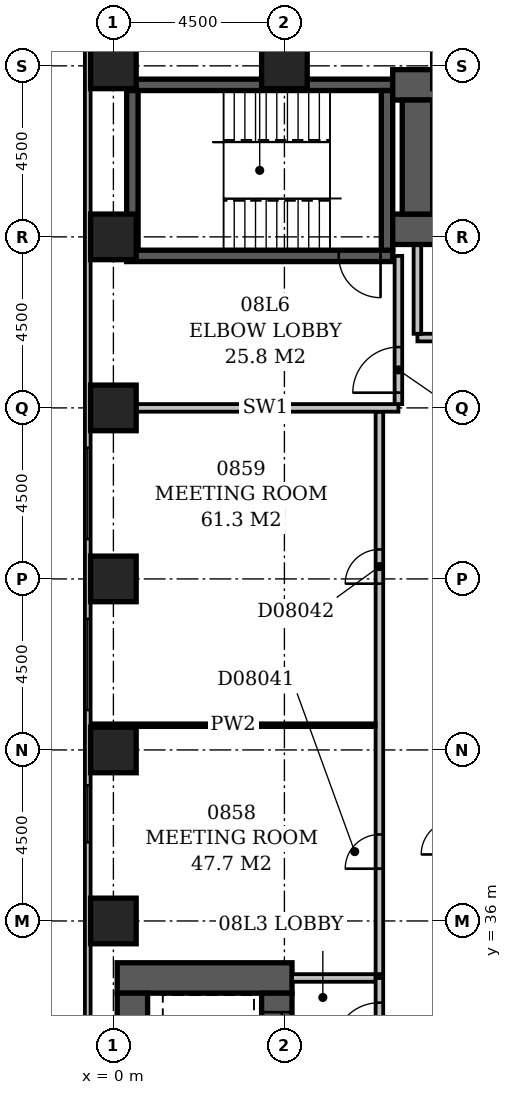
"""IFC4 building model, lengths in metres.
Left out: names, types, materials, properties, quantities, classifications, styles, units other than length and angle.
Written with IfcOpenShell. Run it as: python <this file> out.ifc"""

import sys

from ifc_helpers import new_model, si_unit, direction, frame, frame_2d, origin, origin_2d, place, context, subcontext, project, spatial, rectangle, extrude, element, fill, save


model = new_model("IFC4")
c1 = context("Model", 3, precision=1e-05, world=origin(), true_north=direction((0.0, 1.0)))
c2 = subcontext(c1, "Body", "Model", "MODEL_VIEW")
j1 = project(units=[si_unit("LENGTHUNIT", "METRE"), si_unit("PLANEANGLEUNIT", "RADIAN")], contexts=[c1])
p1 = place(None, origin())
s1 = spatial("IfcSite", under=j1, at=p1, CompositionType="ELEMENT")
p2 = place(p1, origin())
s2 = spatial("IfcBuilding", under=s1, at=p2, CompositionType="ELEMENT")
p3 = place(p2, frame((0.0, 0.0, 39.8)))
s3 = spatial("IfcBuildingStorey", under=s2, at=p3, CompositionType="ELEMENT", Elevation=39.8)
p4 = place(p3, frame((0.1, 34.5, -0.3), z_axis=(0.0, 0.0, 1.0), x_axis=(1.0, 0.0, 0.0)))
e1 = element("IfcWall", 1, at=p4, inside=s3, PredefinedType="SHEAR", context=c2, shape_type="SweptSolid", body=[
    extrude(rectangle(XDim=4.6, YDim=0.8, at=frame_2d((2.3, 0.0))), origin(), (0.0, 0.0, 1.0), 3.6),
])
p5 = place(p3, frame((0.35, 53.5, -0.3), z_axis=(0.0, 0.0, 1.0), x_axis=(1.0, 0.0, 0.0)))
e2 = element("IfcWall", 2, at=p5, inside=s3, PredefinedType="SHEAR", context=c2, shape_type="SweptSolid", body=[
    extrude(rectangle(XDim=7.0, YDim=0.3, at=frame_2d((3.5, 0.0))), origin(), (0.0, 0.0, 1.0), 3.6),
])
p6 = place(p5, frame((5.58, 0.0, 0.3)))
e3 = element("IfcOpeningElement", 3, at=p6, cuts=e2, PredefinedType="OPENING", context=c2, shape_type="SweptSolid", body=[
    extrude(rectangle(XDim=1.1, YDim=2.1, at=frame_2d((0.55, 1.05))), frame((0.0, 0.162, 0.0), z_axis=(0.0, -1.0, 0.0), x_axis=(1.0, 0.0, 0.0)), (0.0, 0.0, 1.0), 0.324),
])
p7 = place(p3, frame((0.35, 58.0, -0.3), z_axis=(0.0, 0.0, 1.0), x_axis=(1.0, 0.0, 0.0)))
e4 = element("IfcWall", 4, at=p7, inside=s3, PredefinedType="SHEAR", context=c2, shape_type="SweptSolid", body=[
    extrude(rectangle(XDim=7.0, YDim=0.3, at=frame_2d((3.5, 0.0))), origin(), (0.0, 0.0, 1.0), 3.6),
])
p8 = place(p3, frame((0.5, 27.15, -0.3), z_axis=(0.0, 0.0, 1.0), x_axis=(0.0, 1.0, 0.0)))
e5 = element("IfcWall", 5, at=p8, inside=s3, PredefinedType="SHEAR", context=c2, shape_type="SweptSolid", body=[
    extrude(rectangle(XDim=6.95, YDim=0.8, at=frame_2d((3.475, 0.0))), origin(), (0.0, 0.0, 1.0), 3.6),
])
p9 = place(p3, frame((0.5, 53.65, -0.3), z_axis=(0.0, 0.0, 1.0), x_axis=(0.0, 1.0, 0.0)))
e6 = element("IfcWall", 6, at=p9, inside=s3, PredefinedType="SHEAR", context=c2, shape_type="SweptSolid", body=[
    extrude(rectangle(XDim=4.2, YDim=0.3, at=frame_2d((2.1, 0.0))), origin(), (0.0, 0.0, 1.0), 3.6),
])
p10 = place(p3, frame((4.3, 27.15, -0.3), z_axis=(0.0, 0.0, 1.0), x_axis=(0.0, 1.0, 0.0)))
e7 = element("IfcWall", 7, at=p10, inside=s3, PredefinedType="SHEAR", context=c2, shape_type="SweptSolid", body=[
    extrude(rectangle(XDim=6.95, YDim=0.8, at=frame_2d((3.475, 0.0))), origin(), (0.0, 0.0, 1.0), 3.6),
])
p11 = place(p10, frame((3.05, 0.0, 0.3)))
e8 = element("IfcOpeningElement", 8, at=p11, cuts=e7, PredefinedType="OPENING", context=c2, shape_type="SweptSolid", body=[
    extrude(rectangle(XDim=1.1, YDim=2.1, at=frame_2d((0.55, 1.05))), frame((0.0, 0.412, 0.0), z_axis=(0.0, -1.0, 0.0), x_axis=(1.0, 0.0, 0.0)), (0.0, 0.0, 1.0), 0.824),
])
p12 = place(p10, frame((0.55, 0.0, 0.3)))
e9 = element("IfcOpeningElement", 9, at=p12, cuts=e7, PredefinedType="OPENING", context=c2, shape_type="SweptSolid", body=[
    extrude(rectangle(XDim=1.1, YDim=2.1, at=frame_2d((0.55, 1.05))), frame((0.0, 0.412, 0.0), z_axis=(0.0, -1.0, 0.0), x_axis=(1.0, 0.0, 0.0)), (0.0, 0.0, 1.0), 0.824),
])
p13 = place(p10, frame((5.35, 0.0, 0.3)))
e10 = element("IfcOpeningElement", 10, at=p13, cuts=e7, PredefinedType="OPENING", context=c2, shape_type="SweptSolid", body=[
    extrude(rectangle(XDim=1.1, YDim=2.1, at=frame_2d((0.55, 1.05))), frame((0.0, 0.412, 0.0), z_axis=(0.0, -1.0, 0.0), x_axis=(1.0, 0.0, 0.0)), (0.0, 0.0, 1.0), 0.824),
])
p14 = place(p3, frame((7.2, 53.65, -0.3), z_axis=(0.0, 0.0, 1.0), x_axis=(0.0, 1.0, 0.0)))
e11 = element("IfcWall", 11, at=p14, inside=s3, PredefinedType="SHEAR", context=c2, shape_type="SweptSolid", body=[
    extrude(rectangle(XDim=4.2, YDim=0.3, at=frame_2d((2.1, 0.0))), origin(), (0.0, 0.0, 1.0), 3.6),
])
p15 = place(p3, frame((7.35, 54.2, -0.3), z_axis=(0.0, 0.0, 1.0), x_axis=(1.0, 0.0, 0.0)))
e12 = element("IfcWall", 12, at=p15, inside=s3, PredefinedType="SHEAR", context=c2, shape_type="SweptSolid", body=[
    extrude(rectangle(XDim=16.45, YDim=0.8, at=frame_2d((8.225, 0.0))), origin(), (0.0, 0.0, 1.0), 3.6),
])
p16 = place(p15, frame((1.35, 0.0, 0.3)))
e13 = element("IfcOpeningElement", 13, at=p16, cuts=e12, PredefinedType="OPENING", context=c2, shape_type="SweptSolid", body=[
    extrude(rectangle(XDim=1.1, YDim=2.1, at=frame_2d((0.55, 1.05))), frame((0.0, 0.412, 0.0), z_axis=(0.0, -1.0, 0.0), x_axis=(1.0, 0.0, 0.0)), (0.0, 0.0, 1.0), 0.824),
])
p17 = place(p15, frame((3.85, 0.0, 0.3)))
e14 = element("IfcOpeningElement", 14, at=p17, cuts=e12, PredefinedType="OPENING", context=c2, shape_type="SweptSolid", body=[
    extrude(rectangle(XDim=1.1, YDim=2.1, at=frame_2d((0.55, 1.05))), frame((0.0, 0.412, 0.0), z_axis=(0.0, -1.0, 0.0), x_axis=(1.0, 0.0, 0.0)), (0.0, 0.0, 1.0), 0.824),
])
p18 = place(p15, frame((6.35, 0.0, 0.3)))
e15 = element("IfcOpeningElement", 15, at=p18, cuts=e12, PredefinedType="OPENING", context=c2, shape_type="SweptSolid", body=[
    extrude(rectangle(XDim=1.1, YDim=2.1, at=frame_2d((0.55, 1.05))), frame((0.0, 0.412, 0.0), z_axis=(0.0, -1.0, 0.0), x_axis=(1.0, 0.0, 0.0)), (0.0, 0.0, 1.0), 0.824),
])
p19 = place(p15, frame((8.85, 0.0, 0.3)))
e16 = element("IfcOpeningElement", 16, at=p19, cuts=e12, PredefinedType="OPENING", context=c2, shape_type="SweptSolid", body=[
    extrude(rectangle(XDim=1.1, YDim=2.1, at=frame_2d((0.55, 1.05))), frame((0.0, 0.412, 0.0), z_axis=(0.0, -1.0, 0.0), x_axis=(1.0, 0.0, 0.0)), (0.0, 0.0, 1.0), 0.824),
])
p20 = place(p15, frame((11.35, 0.0, 0.3)))
e17 = element("IfcOpeningElement", 17, at=p20, cuts=e12, PredefinedType="OPENING", context=c2, shape_type="SweptSolid", body=[
    extrude(rectangle(XDim=1.1, YDim=2.1, at=frame_2d((0.55, 1.05))), frame((0.0, 0.412, 0.0), z_axis=(0.0, -1.0, 0.0), x_axis=(1.0, 0.0, 0.0)), (0.0, 0.0, 1.0), 0.824),
])
p21 = place(p15, frame((13.85, 0.0, 0.3)))
e18 = element("IfcOpeningElement", 18, at=p21, cuts=e12, PredefinedType="OPENING", context=c2, shape_type="SweptSolid", body=[
    extrude(rectangle(XDim=1.1, YDim=2.1, at=frame_2d((0.55, 1.05))), frame((0.0, 0.412, 0.0), z_axis=(0.0, -1.0, 0.0), x_axis=(1.0, 0.0, 0.0)), (0.0, 0.0, 1.0), 0.824),
])
p22 = place(p3, frame((7.35, 58.0, -0.3), z_axis=(0.0, 0.0, 1.0), x_axis=(1.0, 0.0, 0.0)))
e19 = element("IfcWall", 19, at=p22, inside=s3, PredefinedType="SHEAR", context=c2, shape_type="SweptSolid", body=[
    extrude(rectangle(XDim=16.45, YDim=0.8, at=frame_2d((8.225, 0.0))), origin(), (0.0, 0.0, 1.0), 3.6),
])
p23 = place(p3, frame((8.0, 54.6, -0.3), z_axis=(0.0, 0.0, 1.0), x_axis=(0.0, 1.0, 0.0)))
e20 = element("IfcWall", 20, at=p23, inside=s3, PredefinedType="SHEAR", context=c2, shape_type="SweptSolid", body=[
    extrude(rectangle(XDim=3.0, YDim=0.8, at=frame_2d((1.5, 0.0))), origin(), (0.0, 0.0, 1.0), 3.6),
])
for number, where, z_axis, x_axis in (
    (21, (0.0, 36.0, -0.3), (0.0, 0.0, 1.0), (1.0, 0.0, 0.0)),
    (22, (0.0, 40.5, -0.3), (0.0, 0.0, 1.0), (1.0, 0.0, 0.0)),
    (23, (0.0, 45.0, -0.3), (0.0, 0.0, 1.0), (1.0, 0.0, 0.0)),
    (24, (0.0, 49.5, -0.3), (0.0, 0.0, 1.0), (1.0, 0.0, 0.0)),
    (25, (0.0, 54.0, -0.3), (0.0, 0.0, 1.0), (1.0, 0.0, 0.0)),
    (26, (0.0, 58.5, -0.3), (0.0, 0.0, 1.0), (1.0, 0.0, 0.0)),
    (27, (4.5, 58.5, -0.3), (0.0, 0.0, 1.0), (1.0, 0.0, 0.0)),
):
    element("IfcColumn", number, at=place(p3, frame(where, z_axis=z_axis, x_axis=x_axis)), inside=s3, PredefinedType="COLUMN", context=c2, shape_type="SweptSolid", body=[
        extrude(rectangle(XDim=1.2, YDim=1.2, at=origin_2d()), origin(), (0.0, 0.0, 1.0), 3.6),
    ])
p24 = place(p3, frame((-0.675, 59.1, 0.0), z_axis=(0.0, 0.0, 1.0), x_axis=(0.0, -1.0, 0.0)))
e28 = element("IfcWall", 28, at=p24, inside=s3, PredefinedType="STANDARD", context=c2, shape_type="SweptSolid", body=[
    extrude(rectangle(XDim=55.35, YDim=0.15, at=frame_2d((27.675, 0.0))), origin(), (0.0, 0.0, 1.0), 2.7),
])
p25 = place(p24, frame((10.65, 0.0, 0.6)))
e29 = element("IfcOpeningElement", 29, at=p25, cuts=e28, PredefinedType="OPENING", context=c2, shape_type="SweptSolid", body=[
    extrude(rectangle(XDim=2.4, YDim=1.8, at=frame_2d((1.2, 0.9))), frame((0.0, 0.087, 0.0), z_axis=(0.0, -1.0, 0.0), x_axis=(1.0, 0.0, 0.0)), (0.0, 0.0, 1.0), 0.174),
])
p26 = place(p24, frame((15.15, 0.0, 0.6)))
e30 = element("IfcOpeningElement", 30, at=p26, cuts=e28, PredefinedType="OPENING", context=c2, shape_type="SweptSolid", body=[
    extrude(rectangle(XDim=2.4, YDim=1.8, at=frame_2d((1.2, 0.9))), frame((0.0, 0.087, 0.0), z_axis=(0.0, -1.0, 0.0), x_axis=(1.0, 0.0, 0.0)), (0.0, 0.0, 1.0), 0.174),
])
p27 = place(p24, frame((19.53, 0.0, 0.6)))
e31 = element("IfcOpeningElement", 31, at=p27, cuts=e28, PredefinedType="OPENING", context=c2, shape_type="SweptSolid", body=[
    extrude(rectangle(XDim=1.5, YDim=1.8, at=frame_2d((0.75, 0.9))), frame((0.0, 0.087, 0.0), z_axis=(0.0, -1.0, 0.0), x_axis=(1.0, 0.0, 0.0)), (0.0, 0.0, 1.0), 0.174),
])
p28 = place(p3, frame((8.0, 51.35, 0.0), z_axis=(0.0, 0.0, 1.0), x_axis=(1.0, 0.0, 0.0)))
e32 = element("IfcWall", 32, at=p28, inside=s3, PredefinedType="PARTITIONING", context=c2, shape_type="SweptSolid", body=[
    extrude(rectangle(XDim=15.0, YDim=0.2, at=frame_2d((7.5, 0.0))), origin(), (0.0, 0.0, 1.0), 3.3),
])
p29 = place(p28, frame((3.4, 0.0, 0.0)))
e33 = element("IfcOpeningElement", 33, at=p29, cuts=e32, PredefinedType="OPENING", context=c2, shape_type="SweptSolid", body=[
    extrude(rectangle(XDim=1.2, YDim=2.1, at=frame_2d((0.6, 1.05))), frame((0.0, 0.112, 0.0), z_axis=(0.0, -1.0, 0.0), x_axis=(1.0, 0.0, 0.0)), (0.0, 0.0, 1.0), 0.224),
])
p30 = place(p28, frame((9.4, 0.0, 0.0)))
e34 = element("IfcOpeningElement", 34, at=p30, cuts=e32, PredefinedType="OPENING", context=c2, shape_type="SweptSolid", body=[
    extrude(rectangle(XDim=1.2, YDim=2.1, at=frame_2d((0.6, 1.05))), frame((0.0, 0.112, 0.0), z_axis=(0.0, -1.0, 0.0), x_axis=(1.0, 0.0, 0.0)), (0.0, 0.0, 1.0), 0.224),
])
p31 = place(p3, frame((8.0, 51.45, 0.0), z_axis=(0.0, 0.0, 1.0), x_axis=(0.0, 1.0, 0.0)))
e35 = element("IfcWall", 35, at=p31, inside=s3, PredefinedType="PARTITIONING", context=c2, shape_type="SweptSolid", body=[
    extrude(rectangle(XDim=2.33, YDim=0.2, at=frame_2d((1.165, 0.0))), origin(), (0.0, 0.0, 1.0), 3.3),
])
p32 = place(p3, frame((7.0, 32.1, 0.0), z_axis=(0.0, 0.0, 1.0), x_axis=(0.0, 1.0, 0.0)))
e36 = element("IfcWall", 36, at=p32, inside=s3, PredefinedType="PARTITIONING", context=c2, shape_type="SweptSolid", body=[
    extrude(rectangle(XDim=2.4, YDim=0.2, at=frame_2d((1.2, 0.0))), origin(), (0.0, 0.0, 1.0), 3.3),
])
p33 = place(p32, frame((0.55, 0.0, 0.0)))
e37 = element("IfcOpeningElement", 37, at=p33, cuts=e36, PredefinedType="OPENING", context=c2, shape_type="SweptSolid", body=[
    extrude(rectangle(XDim=1.2, YDim=2.1, at=frame_2d((0.6, 1.05))), frame((0.0, 0.112, 0.0), z_axis=(0.0, -1.0, 0.0), x_axis=(1.0, 0.0, 0.0)), (0.0, 0.0, 1.0), 0.224),
])
p34 = place(p3, frame((4.7, 34.5, 0.0), z_axis=(0.0, 0.0, 1.0), x_axis=(1.0, 0.0, 0.0)))
e38 = element("IfcWall", 38, at=p34, inside=s3, PredefinedType="PARTITIONING", context=c2, shape_type="SweptSolid", body=[
    extrude(rectangle(XDim=2.2, YDim=0.2, at=frame_2d((1.1, 0.0))), origin(), (0.0, 0.0, 1.0), 3.3),
])
p35 = place(p3, frame((0.5, 49.5, 0.0), z_axis=(0.0, 0.0, 1.0), x_axis=(1.0, 0.0, 0.0)))
e39 = element("IfcWall", 39, at=p35, inside=s3, PredefinedType="PARTITIONING", context=c2, shape_type="SweptSolid", body=[
    extrude(rectangle(XDim=7.0, YDim=0.2, at=frame_2d((3.5, 0.0))), origin(), (0.0, 0.0, 1.0), 3.3),
])
p36 = place(p3, frame((7.5, 49.6, 0.0), z_axis=(0.0, 0.0, 1.0), x_axis=(0.0, 1.0, 0.0)))
e40 = element("IfcWall", 40, at=p36, inside=s3, PredefinedType="PARTITIONING", context=c2, shape_type="SweptSolid", body=[
    extrude(rectangle(XDim=3.9, YDim=0.2, at=frame_2d((1.95, 0.0))), origin(), (0.0, 0.0, 1.0), 3.3),
])
p37 = place(p36, frame((0.3, 0.0, 0.0)))
e41 = element("IfcOpeningElement", 41, at=p37, cuts=e40, PredefinedType="OPENING", context=c2, shape_type="SweptSolid", body=[
    extrude(rectangle(XDim=1.2, YDim=2.1, at=frame_2d((0.6, 1.05))), frame((0.0, 0.112, 0.0), z_axis=(0.0, -1.0, 0.0), x_axis=(1.0, 0.0, 0.0)), (0.0, 0.0, 1.0), 0.224),
])
p38 = place(p3, frame((7.0, 34.6, 0.0), z_axis=(0.0, 0.0, 1.0), x_axis=(0.0, 1.0, 0.0)))
e42 = element("IfcWall", 42, at=p38, inside=s3, PredefinedType="PARTITIONING", context=c2, shape_type="SweptSolid", body=[
    extrude(rectangle(XDim=14.8, YDim=0.2, at=frame_2d((7.4, 0.0))), origin(), (0.0, 0.0, 1.0), 3.3),
])
p39 = place(p38, frame((2.775, 0.0, 0.0)))
e43 = element("IfcOpeningElement", 43, at=p39, cuts=e42, PredefinedType="OPENING", context=c2, shape_type="SweptSolid", body=[
    extrude(rectangle(XDim=0.9, YDim=2.1, at=frame_2d((0.45, 1.05))), frame((0.0, 0.112, 0.0), z_axis=(0.0, -1.0, 0.0), x_axis=(1.0, 0.0, 0.0)), (0.0, 0.0, 1.0), 0.224),
])
p40 = place(p38, frame((10.275, 0.0, 0.0)))
e44 = element("IfcOpeningElement", 44, at=p40, cuts=e42, PredefinedType="OPENING", context=c2, shape_type="SweptSolid", body=[
    extrude(rectangle(XDim=0.9, YDim=2.1, at=frame_2d((0.45, 1.05))), frame((0.0, 0.112, 0.0), z_axis=(0.0, -1.0, 0.0), x_axis=(1.0, 0.0, 0.0)), (0.0, 0.0, 1.0), 0.224),
])
p41 = place(p3, frame((-0.6, 41.15, 0.0), z_axis=(0.0, 0.0, 1.0), x_axis=(1.0, 0.0, 0.0)))
e45 = element("IfcWall", 45, at=p41, inside=s3, PredefinedType="PARTITIONING", context=c2, shape_type="SweptSolid", body=[
    extrude(rectangle(XDim=7.5, YDim=0.1, at=frame_2d((3.75, 0.0))), origin(), (0.0, 0.0, 1.0), 3.3),
])
p42 = place(p25, origin())
e46 = element("IfcWindow", 46, at=p42, inside=s3, PartitioningType="SINGLE_PANEL", PredefinedType="WINDOW", context=c2, shape_type="SweptSolid", body=[
    extrude(rectangle(XDim=2.4, YDim=1.8, at=frame_2d((1.2, 0.9))), frame((0.0, 0.03, 0.0), z_axis=(0.0, -1.0, 0.0), x_axis=(1.0, 0.0, 0.0)), (0.0, 0.0, 1.0), 0.06),
])
fill(e29, e46)
p43 = place(p26, origin())
e47 = element("IfcWindow", 47, at=p43, inside=s3, PartitioningType="SINGLE_PANEL", PredefinedType="WINDOW", context=c2, shape_type="SweptSolid", body=[
    extrude(rectangle(XDim=2.4, YDim=1.8, at=frame_2d((1.2, 0.9))), frame((0.0, 0.03, 0.0), z_axis=(0.0, -1.0, 0.0), x_axis=(1.0, 0.0, 0.0)), (0.0, 0.0, 1.0), 0.06),
])
fill(e30, e47)
p44 = place(p27, origin())
e48 = element("IfcWindow", 48, at=p44, inside=s3, PartitioningType="SINGLE_PANEL", PredefinedType="WINDOW", context=c2, shape_type="SweptSolid", body=[
    extrude(rectangle(XDim=1.5, YDim=1.8, at=frame_2d((0.75, 0.9))), frame((0.0, 0.03, 0.0), z_axis=(0.0, -1.0, 0.0), x_axis=(1.0, 0.0, 0.0)), (0.0, 0.0, 1.0), 0.06),
])
fill(e31, e48)
p45 = place(p37, origin())
e49 = element("IfcDoor", 49, at=p45, inside=s3, OperationType="SINGLE_SWING_LEFT", PredefinedType="DOOR", context=c2, shape_type="SweptSolid", body=[
    extrude(rectangle(XDim=1.2, YDim=2.1, at=frame_2d((0.6, 1.05))), frame((0.0, 0.025, 0.0), z_axis=(0.0, -1.0, 0.0), x_axis=(1.0, 0.0, 0.0)), (0.0, 0.0, 1.0), 0.05),
])
fill(e41, e49)
p46 = place(p33, origin())
e50 = element("IfcDoor", 50, at=p46, inside=s3, OperationType="SINGLE_SWING_LEFT", PredefinedType="DOOR", context=c2, shape_type="SweptSolid", body=[
    extrude(rectangle(XDim=1.2, YDim=2.1, at=frame_2d((0.6, 1.05))), frame((0.0, 0.025, 0.0), z_axis=(0.0, -1.0, 0.0), x_axis=(1.0, 0.0, 0.0)), (0.0, 0.0, 1.0), 0.05),
])
fill(e37, e50)
p47 = place(p13, origin())
e51 = element("IfcDoor", 51, at=p47, inside=s3, OperationType="SLIDING_TO_LEFT", PredefinedType="DOOR", context=c2, shape_type="SweptSolid", body=[
    extrude(rectangle(XDim=1.1, YDim=2.1, at=frame_2d((0.55, 1.05))), frame((0.0, 0.025, 0.0), z_axis=(0.0, -1.0, 0.0), x_axis=(1.0, 0.0, 0.0)), (0.0, 0.0, 1.0), 0.05),
])
fill(e10, e51)
p48 = place(p6, origin())
e52 = element("IfcDoor", 52, at=p48, inside=s3, OperationType="SINGLE_SWING_RIGHT", PredefinedType="DOOR", context=c2, shape_type="SweptSolid", body=[
    extrude(rectangle(XDim=1.1, YDim=2.1, at=frame_2d((0.55, 1.05))), frame((0.0, 0.025, 0.0), z_axis=(0.0, -1.0, 0.0), x_axis=(1.0, 0.0, 0.0)), (0.0, 0.0, 1.0), 0.05),
])
fill(e3, e52)
p49 = place(p39, origin())
e53 = element("IfcDoor", 53, at=p49, inside=s3, OperationType="SINGLE_SWING_LEFT", PredefinedType="DOOR", context=c2, shape_type="SweptSolid", body=[
    extrude(rectangle(XDim=0.9, YDim=2.1, at=frame_2d((0.45, 1.05))), frame((0.0, 0.025, 0.0), z_axis=(0.0, -1.0, 0.0), x_axis=(1.0, 0.0, 0.0)), (0.0, 0.0, 1.0), 0.05),
])
fill(e43, e53)
p50 = place(p40, origin())
e54 = element("IfcDoor", 54, at=p50, inside=s3, OperationType="SINGLE_SWING_LEFT", PredefinedType="DOOR", context=c2, shape_type="SweptSolid", body=[
    extrude(rectangle(XDim=0.9, YDim=2.1, at=frame_2d((0.45, 1.05))), frame((0.0, 0.025, 0.0), z_axis=(0.0, -1.0, 0.0), x_axis=(1.0, 0.0, 0.0)), (0.0, 0.0, 1.0), 0.05),
])
fill(e44, e54)
save(model, sys.argv[1])
